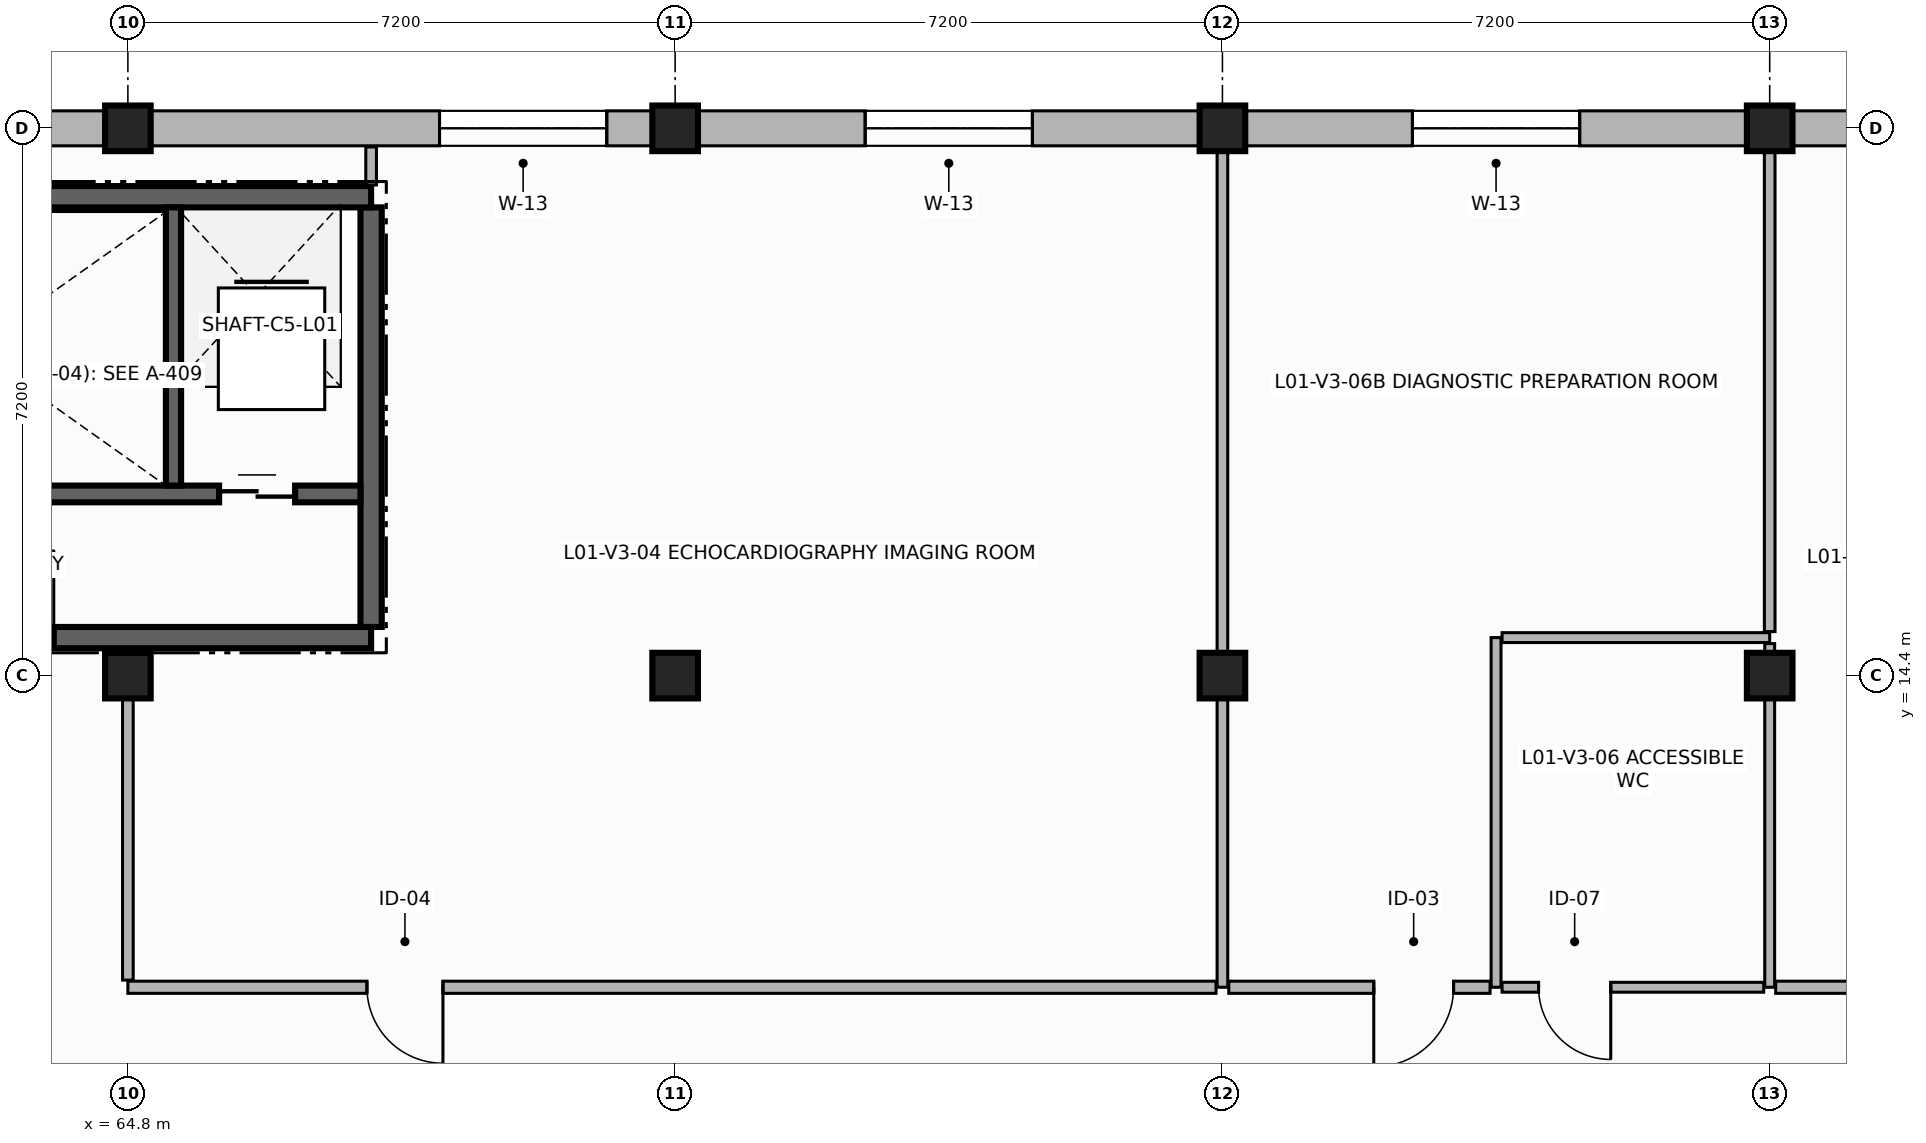
"""IFC4 building model, lengths in metres.
Left out: names, types, materials, properties, quantities, classifications, styles, units other than length and angle.
Written with IfcOpenShell. Run it as: python <this file> out.ifc"""

import sys

from ifc_helpers import new_model, si_unit, direction, frame, frame_2d, origin, origin_2d, place, context, subcontext, project, spatial, rectangle, extrude, element, fill, save


model = new_model("IFC4")
c1 = context("Model", 3, precision=1e-05, world=origin(), true_north=direction((0.0, 1.0)))
c2 = subcontext(c1, "Body", "Model", "MODEL_VIEW")
j1 = project(units=[si_unit("LENGTHUNIT", "METRE"), si_unit("PLANEANGLEUNIT", "RADIAN")], contexts=[c1])
p1 = place(None, origin())
s1 = spatial("IfcSite", under=j1, at=p1, CompositionType="ELEMENT")
p2 = place(p1, origin())
s2 = spatial("IfcBuilding", under=s1, at=p2, CompositionType="ELEMENT")
p3 = place(p2, frame((0.0, 0.0, 4.5)))
s3 = spatial("IfcBuildingStorey", under=s2, at=p3, CompositionType="ELEMENT", Elevation=4.5)
for number, where, z_axis, x_axis in (
    (1, (64.8, 14.4, 0.0), (0.0, 0.0, 1.0), (1.0, 0.0, 0.0)),
    (2, (64.8, 21.6, 0.0), (0.0, 0.0, 1.0), (1.0, 0.0, 0.0)),
    (3, (72.0, 14.4, 0.0), (0.0, 0.0, 1.0), (1.0, 0.0, 0.0)),
    (4, (72.0, 21.6, 0.0), (0.0, 0.0, 1.0), (1.0, 0.0, 0.0)),
    (5, (79.2, 14.4, 0.0), (0.0, 0.0, 1.0), (1.0, 0.0, 0.0)),
    (6, (79.2, 21.6, 0.0), (0.0, 0.0, 1.0), (1.0, 0.0, 0.0)),
    (7, (86.4, 14.4, 0.0), (0.0, 0.0, 1.0), (1.0, 0.0, 0.0)),
    (8, (86.4, 21.6, 0.0), (0.0, 0.0, 1.0), (1.0, 0.0, 0.0)),
):
    element("IfcColumn", number, at=place(p3, frame(where, z_axis=z_axis, x_axis=x_axis)), inside=s3, PredefinedType="COLUMN", context=c2, shape_type="SweptSolid", body=[
        extrude(rectangle(XDim=0.6, YDim=0.6, at=origin_2d()), origin(), (0.0, 0.0, 1.0), 3.55),
    ])
p4 = place(p3, frame((93.6, 21.6, 0.0), z_axis=(0.0, 0.0, 1.0), x_axis=(-1.0, 0.0, 0.0)))
e9 = element("IfcWall", 9, at=p4, inside=s3, PredefinedType="SOLIDWALL", context=c2, shape_type="SweptSolid", body=[
    extrude(rectangle(XDim=7.2, YDim=0.46, at=frame_2d((3.6, 0.0))), origin(), (0.0, 0.0, 1.0), 2.83),
])
p5 = place(p4, frame((2.5, 0.0, 1.2)))
e10 = element("IfcOpeningElement", 10, at=p5, cuts=e9, PredefinedType="OPENING", context=c2, shape_type="SweptSolid", body=[
    extrude(rectangle(XDim=2.2, YDim=1.1, at=frame_2d((1.1, 0.55))), frame((0.0, 0.24, 0.0), z_axis=(0.0, -1.0, 0.0), x_axis=(1.0, 0.0, 0.0)), (0.0, 0.0, 1.0), 0.48),
])
p6 = place(p3, frame((86.4, 21.6, 0.0), z_axis=(0.0, 0.0, 1.0), x_axis=(-1.0, 0.0, 0.0)))
e11 = element("IfcWall", 11, at=p6, inside=s3, PredefinedType="SOLIDWALL", context=c2, shape_type="SweptSolid", body=[
    extrude(rectangle(XDim=7.2, YDim=0.46, at=frame_2d((3.6, 0.0))), origin(), (0.0, 0.0, 1.0), 2.83),
])
p7 = place(p6, frame((2.5, 0.0, 1.2)))
e12 = element("IfcOpeningElement", 12, at=p7, cuts=e11, PredefinedType="OPENING", context=c2, shape_type="SweptSolid", body=[
    extrude(rectangle(XDim=2.2, YDim=1.1, at=frame_2d((1.1, 0.55))), frame((0.0, 0.24, 0.0), z_axis=(0.0, -1.0, 0.0), x_axis=(1.0, 0.0, 0.0)), (0.0, 0.0, 1.0), 0.48),
])
p8 = place(p3, frame((79.2, 21.6, 0.0), z_axis=(0.0, 0.0, 1.0), x_axis=(-1.0, 0.0, 0.0)))
e13 = element("IfcWall", 13, at=p8, inside=s3, PredefinedType="SOLIDWALL", context=c2, shape_type="SweptSolid", body=[
    extrude(rectangle(XDim=7.2, YDim=0.46, at=frame_2d((3.6, 0.0))), origin(), (0.0, 0.0, 1.0), 2.83),
])
p9 = place(p8, frame((2.5, 0.0, 1.2)))
e14 = element("IfcOpeningElement", 14, at=p9, cuts=e13, PredefinedType="OPENING", context=c2, shape_type="SweptSolid", body=[
    extrude(rectangle(XDim=2.2, YDim=1.1, at=frame_2d((1.1, 0.55))), frame((0.0, 0.24, 0.0), z_axis=(0.0, -1.0, 0.0), x_axis=(1.0, 0.0, 0.0)), (0.0, 0.0, 1.0), 0.48),
])
p10 = place(p3, frame((72.0, 21.6, 0.0), z_axis=(0.0, 0.0, 1.0), x_axis=(-1.0, 0.0, 0.0)))
e15 = element("IfcWall", 15, at=p10, inside=s3, PredefinedType="SOLIDWALL", context=c2, shape_type="SweptSolid", body=[
    extrude(rectangle(XDim=7.2, YDim=0.46, at=frame_2d((3.6, 0.0))), origin(), (0.0, 0.0, 1.0), 2.83),
])
p11 = place(p10, frame((0.9, 0.0, 1.2)))
e16 = element("IfcOpeningElement", 16, at=p11, cuts=e15, PredefinedType="OPENING", context=c2, shape_type="SweptSolid", body=[
    extrude(rectangle(XDim=2.2, YDim=1.1, at=frame_2d((1.1, 0.55))), frame((0.0, 0.24, 0.0), z_axis=(0.0, -1.0, 0.0), x_axis=(1.0, 0.0, 0.0)), (0.0, 0.0, 1.0), 0.48),
])
p12 = place(p3, frame((64.8, 21.6, 0.0), z_axis=(0.0, 0.0, 1.0), x_axis=(-1.0, 0.0, 0.0)))
e17 = element("IfcWall", 17, at=p12, inside=s3, PredefinedType="SOLIDWALL", context=c2, shape_type="SweptSolid", body=[
    extrude(rectangle(XDim=7.2, YDim=0.46, at=frame_2d((3.6, 0.0))), origin(), (0.0, 0.0, 1.0), 2.83),
])
p13 = place(p12, frame((2.5, 0.0, 1.2)))
e18 = element("IfcOpeningElement", 18, at=p13, cuts=e17, PredefinedType="OPENING", context=c2, shape_type="SweptSolid", body=[
    extrude(rectangle(XDim=2.2, YDim=1.1, at=frame_2d((1.1, 0.55))), frame((0.0, 0.24, 0.0), z_axis=(0.0, -1.0, 0.0), x_axis=(1.0, 0.0, 0.0)), (0.0, 0.0, 1.0), 0.48),
])
p14 = place(p3, frame((58.5, 14.9, 0.0), z_axis=(0.0, 0.0, 1.0), x_axis=(1.0, 0.0, 0.0)))
e19 = element("IfcWall", 19, at=p14, inside=s3, PredefinedType="SHEAR", context=c2, shape_type="SweptSolid", body=[
    extrude(rectangle(XDim=9.5, YDim=0.28, at=frame_2d((4.75, 0.0))), origin(), (0.0, 0.0, 1.0), 3.55),
])
p15 = place(p14, frame((4.175, 0.0, 0.0)))
e20 = element("IfcOpeningElement", 20, at=p15, cuts=e19, PredefinedType="OPENING", context=c2, shape_type="SweptSolid", body=[
    extrude(rectangle(XDim=1.15, YDim=2.2, at=frame_2d((0.575, 1.1))), frame((0.0, 0.15, 0.0), z_axis=(0.0, -1.0, 0.0), x_axis=(1.0, 0.0, 0.0)), (0.0, 0.0, 1.0), 0.3),
])
p16 = place(p3, frame((68.0, 15.04, 0.0), z_axis=(0.0, 0.0, 1.0), x_axis=(0.0, 1.0, 0.0)))
e21 = element("IfcWall", 21, at=p16, inside=s3, PredefinedType="SHEAR", context=c2, shape_type="SweptSolid", body=[
    extrude(rectangle(XDim=5.52, YDim=0.28, at=frame_2d((2.76, 0.0))), origin(), (0.0, 0.0, 1.0), 3.55),
])
p17 = place(p3, frame((68.0, 20.7, 0.0), z_axis=(0.0, 0.0, 1.0), x_axis=(-1.0, 0.0, 0.0)))
e22 = element("IfcWall", 22, at=p17, inside=s3, PredefinedType="SHEAR", context=c2, shape_type="SweptSolid", body=[
    extrude(rectangle(XDim=9.5, YDim=0.28, at=frame_2d((4.75, 0.0))), origin(), (0.0, 0.0, 1.0), 3.55),
])
p18 = place(p3, frame((58.64, 16.79, 0.0), z_axis=(0.0, 0.0, 1.0), x_axis=(1.0, 0.0, 0.0)))
e23 = element("IfcWall", 23, at=p18, inside=s3, PredefinedType="SHEAR", context=c2, shape_type="SweptSolid", body=[
    extrude(rectangle(XDim=9.22, YDim=0.22, at=frame_2d((4.61, 0.0))), origin(), (0.0, 0.0, 1.0), 3.55),
])
p19 = place(p18, frame((0.31, 0.0, 0.0)))
e24 = element("IfcOpeningElement", 24, at=p19, cuts=e23, PredefinedType="OPENING", context=c2, shape_type="SweptSolid", body=[
    extrude(rectangle(XDim=1.1, YDim=2.15, at=frame_2d((0.55, 1.075))), frame((0.0, 0.12, 0.0), z_axis=(0.0, -1.0, 0.0), x_axis=(1.0, 0.0, 0.0)), (0.0, 0.0, 1.0), 0.24),
])
p20 = place(p18, frame((7.36, 0.0, 0.0)))
e25 = element("IfcOpeningElement", 25, at=p20, cuts=e23, PredefinedType="OPENING", context=c2, shape_type="SweptSolid", body=[
    extrude(rectangle(XDim=1.0, YDim=2.2, at=frame_2d((0.5, 1.1))), frame((0.0, 0.12, 0.0), z_axis=(0.0, -1.0, 0.0), x_axis=(1.0, 0.0, 0.0)), (0.0, 0.0, 1.0), 0.24),
])
p21 = place(p3, frame((65.4, 16.9, 0.0), z_axis=(0.0, 0.0, 1.0), x_axis=(0.0, 1.0, 0.0)))
e26 = element("IfcWall", 26, at=p21, inside=s3, PredefinedType="SHEAR", context=c2, shape_type="SweptSolid", body=[
    extrude(rectangle(XDim=3.66, YDim=0.2, at=frame_2d((1.83, 0.0))), origin(), (0.0, 0.0, 1.0), 3.55),
])
p22 = place(p3, frame((79.2, 21.355, 0.0), z_axis=(0.0, 0.0, 1.0), x_axis=(0.0, -1.0, 0.0)))
e27 = element("IfcWall", 27, at=p22, inside=s3, PredefinedType="PARTITIONING", context=c2, shape_type="SweptSolid", body=[
    extrude(rectangle(XDim=11.055, YDim=0.14, at=frame_2d((5.527, 0.0))), origin(), (0.0, 0.0, 1.0), 2.81),
])
p23 = place(p3, frame((79.116, 10.3, 0.0), z_axis=(0.0, 0.0, 1.0), x_axis=(-1.0, 0.0, 0.0)))
e28 = element("IfcWall", 28, at=p23, inside=s3, PredefinedType="PARTITIONING", context=c2, shape_type="SweptSolid", body=[
    extrude(rectangle(XDim=14.316, YDim=0.16, at=frame_2d((7.158, 0.0))), origin(), (0.0, 0.0, 1.0), 2.81),
])
p24 = place(p23, frame((10.171, 0.0, 0.0)))
e29 = element("IfcOpeningElement", 29, at=p24, cuts=e28, PredefinedType="OPENING", context=c2, shape_type="SweptSolid", body=[
    extrude(rectangle(XDim=1.0, YDim=2.15, at=frame_2d((0.5, 1.075))), frame((0.0, 0.09, 0.0), z_axis=(0.0, -1.0, 0.0), x_axis=(1.0, 0.0, 0.0)), (0.0, 0.0, 1.0), 0.18),
])
p25 = place(p3, frame((64.8, 10.394, 0.0), z_axis=(0.0, 0.0, 1.0), x_axis=(0.0, 1.0, 0.0)))
e30 = element("IfcWall", 30, at=p25, inside=s3, PredefinedType="PARTITIONING", context=c2, shape_type="SweptSolid", body=[
    extrude(rectangle(XDim=4.351, YDim=0.14, at=frame_2d((2.176, 0.0))), origin(), (0.0, 0.0, 1.0), 2.81),
])
p26 = place(p3, frame((68.0, 20.855, 0.0), z_axis=(0.0, 0.0, 1.0), x_axis=(0.0, 1.0, 0.0)))
e31 = element("IfcWall", 31, at=p26, inside=s3, PredefinedType="PARTITIONING", context=c2, shape_type="SweptSolid", body=[
    extrude(rectangle(XDim=0.5, YDim=0.14, at=frame_2d((0.25, 0.0))), origin(), (0.0, 0.0, 1.0), 2.81),
])
p27 = place(p3, frame((82.8, 10.3, 0.0), z_axis=(0.0, 0.0, 1.0), x_axis=(0.0, 1.0, 0.0)))
e32 = element("IfcWall", 32, at=p27, inside=s3, PredefinedType="PARTITIONING", context=c2, shape_type="SweptSolid", body=[
    extrude(rectangle(XDim=4.6, YDim=0.13, at=frame_2d((2.3, 0.0))), origin(), (0.0, 0.0, 1.0), 2.81),
])
p28 = place(p3, frame((82.879, 14.9, 0.0), z_axis=(0.0, 0.0, 1.0), x_axis=(1.0, 0.0, 0.0)))
e33 = element("IfcWall", 33, at=p28, inside=s3, PredefinedType="PARTITIONING", context=c2, shape_type="SweptSolid", body=[
    extrude(rectangle(XDim=3.521, YDim=0.13, at=frame_2d((1.76, 0.0))), origin(), (0.0, 0.0, 1.0), 2.81),
])
p29 = place(p3, frame((86.4, 14.821, 0.0), z_axis=(0.0, 0.0, 1.0), x_axis=(0.0, -1.0, 0.0)))
e34 = element("IfcWall", 34, at=p29, inside=s3, PredefinedType="PARTITIONING", context=c2, shape_type="SweptSolid", body=[
    extrude(rectangle(XDim=4.521, YDim=0.13, at=frame_2d((2.26, 0.0))), origin(), (0.0, 0.0, 1.0), 2.81),
])
p30 = place(p3, frame((86.321, 10.3, 0.0), z_axis=(0.0, 0.0, 1.0), x_axis=(-1.0, 0.0, 0.0)))
e35 = element("IfcWall", 35, at=p30, inside=s3, PredefinedType="PARTITIONING", context=c2, shape_type="SweptSolid", body=[
    extrude(rectangle(XDim=3.442, YDim=0.13, at=frame_2d((1.721, 0.0))), origin(), (0.0, 0.0, 1.0), 2.81),
])
p31 = place(p30, frame((2.012, 0.0, 0.0)))
e36 = element("IfcOpeningElement", 36, at=p31, cuts=e35, PredefinedType="OPENING", context=c2, shape_type="SweptSolid", body=[
    extrude(rectangle(XDim=0.95, YDim=2.1, at=frame_2d((0.475, 1.05))), frame((0.0, 0.075, 0.0), z_axis=(0.0, -1.0, 0.0), x_axis=(1.0, 0.0, 0.0)), (0.0, 0.0, 1.0), 0.15),
])
p32 = place(p3, frame((82.721, 10.3, 0.0), z_axis=(0.0, 0.0, 1.0), x_axis=(-1.0, 0.0, 0.0)))
e37 = element("IfcWall", 37, at=p32, inside=s3, PredefinedType="PARTITIONING", context=c2, shape_type="SweptSolid", body=[
    extrude(rectangle(XDim=3.437, YDim=0.16, at=frame_2d((1.719, 0.0))), origin(), (0.0, 0.0, 1.0), 2.81),
])
p33 = place(p32, frame((0.48, 0.0, 0.0)))
e38 = element("IfcOpeningElement", 38, at=p33, cuts=e37, PredefinedType="OPENING", context=c2, shape_type="SweptSolid", body=[
    extrude(rectangle(XDim=1.05, YDim=2.15, at=frame_2d((0.525, 1.075))), frame((0.0, 0.09, 0.0), z_axis=(0.0, -1.0, 0.0), x_axis=(1.0, 0.0, 0.0)), (0.0, 0.0, 1.0), 0.18),
])
p34 = place(p3, frame((86.4, 21.355, 0.0), z_axis=(0.0, 0.0, 1.0), x_axis=(0.0, -1.0, 0.0)))
e39 = element("IfcWall", 39, at=p34, inside=s3, PredefinedType="PARTITIONING", context=c2, shape_type="SweptSolid", body=[
    extrude(rectangle(XDim=6.376, YDim=0.14, at=frame_2d((3.188, 0.0))), origin(), (0.0, 0.0, 1.0), 2.81),
])
p35 = place(p3, frame((93.355, 10.3, 0.0), z_axis=(0.0, 0.0, 1.0), x_axis=(-1.0, 0.0, 0.0)))
e40 = element("IfcWall", 40, at=p35, inside=s3, PredefinedType="PARTITIONING", context=c2, shape_type="SweptSolid", body=[
    extrude(rectangle(XDim=6.876, YDim=0.16, at=frame_2d((3.438, 0.0))), origin(), (0.0, 0.0, 1.0), 2.81),
])
p36 = place(p35, frame((2.797, 0.0, 0.0)))
e41 = element("IfcOpeningElement", 41, at=p36, cuts=e40, PredefinedType="OPENING", context=c2, shape_type="SweptSolid", body=[
    extrude(rectangle(XDim=1.05, YDim=2.15, at=frame_2d((0.525, 1.075))), frame((0.0, 0.09, 0.0), z_axis=(0.0, -1.0, 0.0), x_axis=(1.0, 0.0, 0.0)), (0.0, 0.0, 1.0), 0.18),
])
p37 = place(p7, origin())
e42 = element("IfcWindow", 42, at=p37, inside=s3, PartitioningType="SINGLE_PANEL", PredefinedType="WINDOW", context=c2, shape_type="SweptSolid", body=[
    extrude(rectangle(XDim=2.2, YDim=1.1, at=frame_2d((1.1, 0.55))), frame((0.0, 0.03, 0.0), z_axis=(0.0, -1.0, 0.0), x_axis=(1.0, 0.0, 0.0)), (0.0, 0.0, 1.0), 0.06),
])
fill(e12, e42)
p38 = place(p9, origin())
e43 = element("IfcWindow", 43, at=p38, inside=s3, PartitioningType="SINGLE_PANEL", PredefinedType="WINDOW", context=c2, shape_type="SweptSolid", body=[
    extrude(rectangle(XDim=2.2, YDim=1.1, at=frame_2d((1.1, 0.55))), frame((0.0, 0.03, 0.0), z_axis=(0.0, -1.0, 0.0), x_axis=(1.0, 0.0, 0.0)), (0.0, 0.0, 1.0), 0.06),
])
fill(e14, e43)
p39 = place(p11, origin())
e44 = element("IfcWindow", 44, at=p39, inside=s3, PartitioningType="SINGLE_PANEL", PredefinedType="WINDOW", context=c2, shape_type="SweptSolid", body=[
    extrude(rectangle(XDim=2.2, YDim=1.1, at=frame_2d((1.1, 0.55))), frame((0.0, 0.03, 0.0), z_axis=(0.0, -1.0, 0.0), x_axis=(1.0, 0.0, 0.0)), (0.0, 0.0, 1.0), 0.06),
])
fill(e16, e44)
p40 = place(p20, origin())
e45 = element("IfcDoor", 45, at=p40, inside=s3, OperationType="DOUBLE_DOOR_SLIDING", PredefinedType="DOOR", context=c2, shape_type="SweptSolid", body=[
    extrude(rectangle(XDim=1.0, YDim=2.2, at=frame_2d((0.5, 1.1))), frame((0.0, 0.025, 0.0), z_axis=(0.0, -1.0, 0.0), x_axis=(1.0, 0.0, 0.0)), (0.0, 0.0, 1.0), 0.05),
])
fill(e25, e45)
p41 = place(p15, origin())
e46 = element("IfcDoor", 46, at=p41, inside=s3, OperationType="SINGLE_SWING_RIGHT", PredefinedType="DOOR", context=c2, shape_type="SweptSolid", body=[
    extrude(rectangle(XDim=1.15, YDim=2.2, at=frame_2d((0.575, 1.1))), frame((0.0, 0.025, 0.0), z_axis=(0.0, -1.0, 0.0), x_axis=(1.0, 0.0, 0.0)), (0.0, 0.0, 1.0), 0.05),
])
fill(e20, e46)
p42 = place(p24, origin())
e47 = element("IfcDoor", 47, at=p42, inside=s3, OperationType="SINGLE_SWING_LEFT", PredefinedType="DOOR", context=c2, shape_type="SweptSolid", body=[
    extrude(rectangle(XDim=1.0, YDim=2.15, at=frame_2d((0.5, 1.075))), frame((0.0, 0.025, 0.0), z_axis=(0.0, -1.0, 0.0), x_axis=(1.0, 0.0, 0.0)), (0.0, 0.0, 1.0), 0.05),
])
fill(e29, e47)
p43 = place(p31, origin())
e48 = element("IfcDoor", 48, at=p43, inside=s3, OperationType="SINGLE_SWING_LEFT", PredefinedType="DOOR", context=c2, shape_type="SweptSolid", body=[
    extrude(rectangle(XDim=0.95, YDim=2.1, at=frame_2d((0.475, 1.05))), frame((0.0, 0.025, 0.0), z_axis=(0.0, -1.0, 0.0), x_axis=(1.0, 0.0, 0.0)), (0.0, 0.0, 1.0), 0.05),
])
fill(e36, e48)
p44 = place(p33, origin())
e49 = element("IfcDoor", 49, at=p44, inside=s3, OperationType="SINGLE_SWING_RIGHT", PredefinedType="DOOR", context=c2, shape_type="SweptSolid", body=[
    extrude(rectangle(XDim=1.05, YDim=2.15, at=frame_2d((0.525, 1.075))), frame((0.0, 0.025, 0.0), z_axis=(0.0, -1.0, 0.0), x_axis=(1.0, 0.0, 0.0)), (0.0, 0.0, 1.0), 0.05),
])
fill(e38, e49)
save(model, sys.argv[1])
